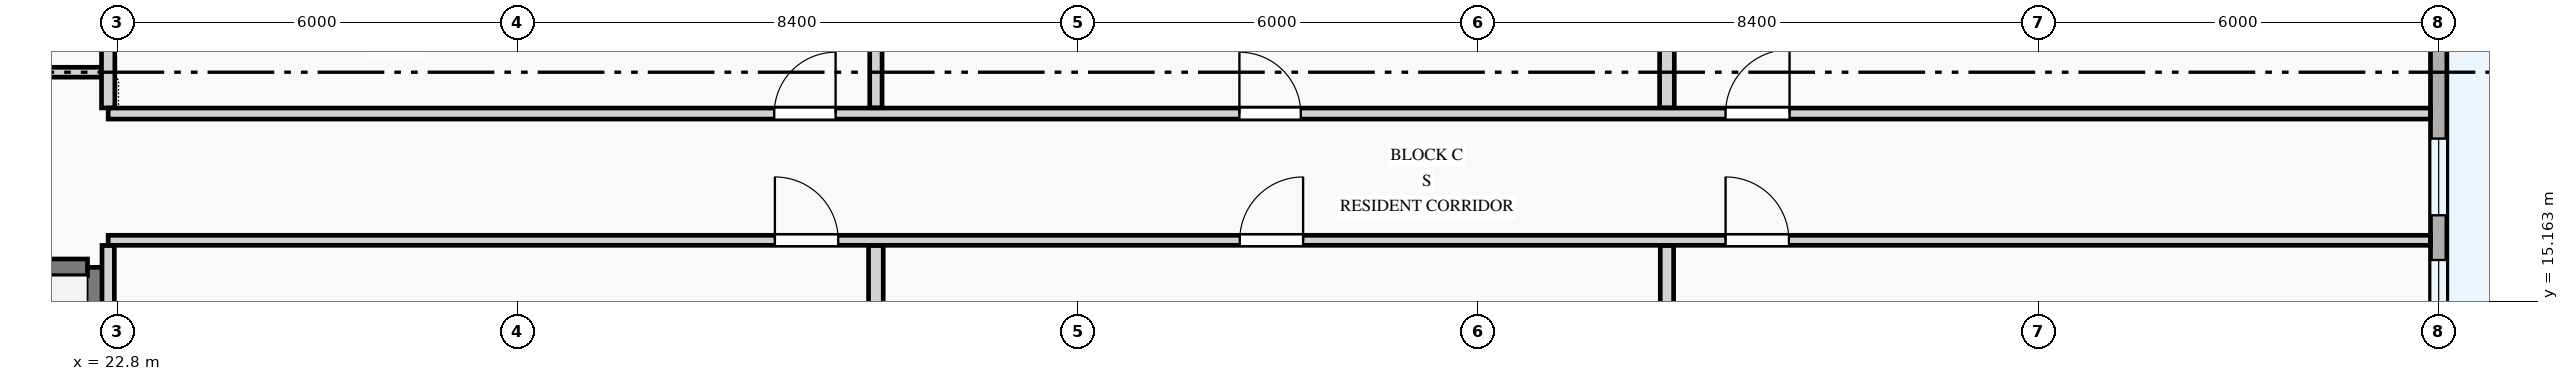
"""IFC4 building model, lengths in metres.
Left out: names, types, materials, properties, quantities, classifications, styles, units other than length and angle.
Written with IfcOpenShell. Run it as: python <this file> out.ifc"""

import sys

from ifc_helpers import new_model, si_unit, direction, frame, frame_2d, origin, place, context, subcontext, project, spatial, rectangle, extrude, element, fill, save


model = new_model("IFC4")
c1 = context("Model", 3, precision=1e-05, world=origin(), true_north=direction((0.0, 1.0)))
c2 = subcontext(c1, "Body", "Model", "MODEL_VIEW")
j1 = project(units=[si_unit("LENGTHUNIT", "METRE"), si_unit("PLANEANGLEUNIT", "RADIAN")], contexts=[c1])
p1 = place(None, origin())
s1 = spatial("IfcSite", under=j1, at=p1, CompositionType="ELEMENT")
p2 = place(p1, origin())
s2 = spatial("IfcBuilding", under=s1, at=p2, CompositionType="ELEMENT")
p3 = place(p2, origin())
s3 = spatial("IfcBuildingStorey", under=s2, at=p3, CompositionType="ELEMENT", Elevation=0.0)
p4 = place(p3, frame((57.6, 14.4, 0.0), z_axis=(0.0, 0.0, 1.0), x_axis=(0.0, 1.0, 0.0)))
e1 = element("IfcWall", 1, at=p4, inside=s3, PredefinedType="STANDARD", context=c2, shape_type="SweptSolid", body=[
    extrude(rectangle(XDim=8.4, YDim=0.245, at=frame_2d((4.2, 0.0))), origin(), (0.0, 0.0, 1.0), 3.485),
])
p5 = place(p4, frame((0.485, 0.0, 0.78)))
e2 = element("IfcOpeningElement", 2, at=p5, cuts=e1, PredefinedType="OPENING", context=c2, shape_type="SweptSolid", body=[
    extrude(rectangle(XDim=0.9, YDim=1.2, at=frame_2d((0.45, 0.6))), frame((0.0, 0.133, 0.0), z_axis=(0.0, -1.0, 0.0), x_axis=(1.0, 0.0, 0.0)), (0.0, 0.0, 1.0), 0.265),
])
p6 = place(p4, frame((2.055, 0.0, 0.78)))
e3 = element("IfcOpeningElement", 3, at=p6, cuts=e1, PredefinedType="OPENING", context=c2, shape_type="SweptSolid", body=[
    extrude(rectangle(XDim=1.15, YDim=1.25, at=frame_2d((0.575, 0.625))), frame((0.0, 0.133, 0.0), z_axis=(0.0, -1.0, 0.0), x_axis=(1.0, 0.0, 0.0)), (0.0, 0.0, 1.0), 0.265),
])
p7 = place(p4, frame((5.095, 0.0, 0.78)))
e4 = element("IfcOpeningElement", 4, at=p7, cuts=e1, PredefinedType="OPENING", context=c2, shape_type="SweptSolid", body=[
    extrude(rectangle(XDim=1.6, YDim=1.75, at=frame_2d((0.8, 0.875))), frame((0.0, 0.133, 0.0), z_axis=(0.0, -1.0, 0.0), x_axis=(1.0, 0.0, 0.0)), (0.0, 0.0, 1.0), 0.265),
])
p8 = place(p3, frame((22.475, 8.75, 0.0), z_axis=(0.0, 0.0, 1.0), x_axis=(0.0, 1.0, 0.0)))
e5 = element("IfcWall", 5, at=p8, inside=s3, PredefinedType="SHEAR", context=c2, shape_type="SweptSolid", body=[
    extrude(rectangle(XDim=6.925, YDim=0.3, at=frame_2d((3.462, 0.0))), origin(), (0.0, 0.0, 1.0), 4.2),
])
p9 = place(p3, frame((8.85, 15.675, 0.0), z_axis=(0.0, 0.0, 1.0), x_axis=(1.0, 0.0, 0.0)))
e6 = element("IfcWall", 6, at=p9, inside=s3, PredefinedType="SHEAR", context=c2, shape_type="SweptSolid", body=[
    extrude(rectangle(XDim=13.5, YDim=0.25, at=frame_2d((6.75, 0.0))), origin(), (0.0, 0.0, 1.0), 4.2),
])
p10 = place(p9, frame((6.2, 0.0, 0.0)))
e7 = element("IfcOpeningElement", 7, at=p10, cuts=e6, PredefinedType="OPENING", context=c2, shape_type="SweptSolid", body=[
    extrude(rectangle(XDim=1.1, YDim=2.15, at=frame_2d((0.55, 1.075))), frame((0.0, 0.135, 0.0), z_axis=(0.0, -1.0, 0.0), x_axis=(1.0, 0.0, 0.0)), (0.0, 0.0, 1.0), 0.27),
])
p11 = place(p3, frame((18.025, 18.6, 0.0), z_axis=(0.0, 0.0, 1.0), x_axis=(1.0, 0.0, 0.0)))
e8 = element("IfcWall", 8, at=p11, inside=s3, PredefinedType="PARTITIONING", context=c2, shape_type="SweptSolid", body=[
    extrude(rectangle(XDim=4.533, YDim=0.148, at=frame_2d((2.267, 0.0))), origin(), (0.0, 0.0, 1.0), 4.2),
])
p12 = place(p11, frame((1.65, 0.0, 0.0)))
e9 = element("IfcOpeningElement", 9, at=p12, cuts=e8, PredefinedType="OPENING", context=c2, shape_type="SweptSolid", body=[
    extrude(rectangle(XDim=1.0, YDim=2.15, at=frame_2d((0.5, 1.075))), frame((0.0, 0.084, 0.0), z_axis=(0.0, -1.0, 0.0), x_axis=(1.0, 0.0, 0.0)), (0.0, 0.0, 1.0), 0.168),
])
p13 = place(p3, frame((22.66, 8.524, 0.0), z_axis=(0.0, 0.0, 1.0), x_axis=(0.0, 1.0, 0.0)))
e10 = element("IfcWall", 10, at=p13, inside=s3, PredefinedType="PARTITIONING", context=c2, shape_type="SweptSolid", body=[
    extrude(rectangle(XDim=7.479, YDim=0.185, at=frame_2d((3.739, 0.0))), origin(), (0.0, 0.0, 1.0), 3.485),
])
p14 = place(p3, frame((22.66, 18.064, 0.0), z_axis=(0.0, 0.0, 1.0), x_axis=(0.0, 1.0, 0.0)))
e11 = element("IfcWall", 11, at=p14, inside=s3, PredefinedType="PARTITIONING", context=c2, shape_type="SweptSolid", body=[
    extrude(rectangle(XDim=4.676, YDim=0.2, at=frame_2d((2.338, 0.0))), origin(), (0.0, 0.0, 1.0), 3.485),
])
p15 = place(p3, frame((34.17, 8.524, 0.0), z_axis=(0.0, 0.0, 1.0), x_axis=(0.0, 1.0, 0.0)))
e12 = element("IfcWall", 12, at=p15, inside=s3, PredefinedType="PARTITIONING", context=c2, shape_type="SweptSolid", body=[
    extrude(rectangle(XDim=7.479, YDim=0.22, at=frame_2d((3.739, 0.0))), origin(), (0.0, 0.0, 1.0), 4.2),
])
p16 = place(p3, frame((34.17, 18.064, 0.0), z_axis=(0.0, 0.0, 1.0), x_axis=(0.0, 1.0, 0.0)))
e13 = element("IfcWall", 13, at=p16, inside=s3, PredefinedType="PARTITIONING", context=c2, shape_type="SweptSolid", body=[
    extrude(rectangle(XDim=4.611, YDim=0.185, at=frame_2d((2.306, 0.0))), origin(), (0.0, 0.0, 1.0), 4.2),
])
p17 = place(p3, frame((46.03, 8.524, 0.0), z_axis=(0.0, 0.0, 1.0), x_axis=(0.0, 1.0, 0.0)))
e14 = element("IfcWall", 14, at=p17, inside=s3, PredefinedType="PARTITIONING", context=c2, shape_type="SweptSolid", body=[
    extrude(rectangle(XDim=7.479, YDim=0.2, at=frame_2d((3.739, 0.0))), origin(), (0.0, 0.0, 1.0), 4.2),
])
p18 = place(p3, frame((46.03, 18.064, 0.0), z_axis=(0.0, 0.0, 1.0), x_axis=(0.0, 1.0, 0.0)))
e15 = element("IfcWall", 15, at=p18, inside=s3, PredefinedType="PARTITIONING", context=c2, shape_type="SweptSolid", body=[
    extrude(rectangle(XDim=4.611, YDim=0.22, at=frame_2d((2.306, 0.0))), origin(), (0.0, 0.0, 1.0), 4.2),
])
p19 = place(p3, frame((22.66, 16.08, 0.0), z_axis=(0.0, 0.0, 1.0), x_axis=(1.0, 0.0, 0.0)))
e16 = element("IfcWall", 16, at=p19, inside=s3, PredefinedType="PARTITIONING", context=c2, shape_type="SweptSolid", body=[
    extrude(rectangle(XDim=34.816, YDim=0.15, at=frame_2d((17.408, 0.0))), origin(), (0.0, 0.0, 1.0), 4.2),
])
p20 = place(p19, frame((9.996, 0.0, 0.0)))
e17 = element("IfcOpeningElement", 17, at=p20, cuts=e16, PredefinedType="OPENING", context=c2, shape_type="SweptSolid", body=[
    extrude(rectangle(XDim=0.95, YDim=2.1, at=frame_2d((0.475, 1.05))), frame((0.0, 0.085, 0.0), z_axis=(0.0, -1.0, 0.0), x_axis=(1.0, 0.0, 0.0)), (0.0, 0.0, 1.0), 0.17),
])
p21 = place(p19, frame((16.965, 0.0, 0.0)))
e18 = element("IfcOpeningElement", 18, at=p21, cuts=e16, PredefinedType="OPENING", context=c2, shape_type="SweptSolid", body=[
    extrude(rectangle(XDim=0.95, YDim=2.1, at=frame_2d((0.475, 1.05))), frame((0.0, 0.085, 0.0), z_axis=(0.0, -1.0, 0.0), x_axis=(1.0, 0.0, 0.0)), (0.0, 0.0, 1.0), 0.17),
])
p22 = place(p19, frame((24.249, 0.0, 0.0)))
e19 = element("IfcOpeningElement", 19, at=p22, cuts=e16, PredefinedType="OPENING", context=c2, shape_type="SweptSolid", body=[
    extrude(rectangle(XDim=0.95, YDim=2.1, at=frame_2d((0.475, 1.05))), frame((0.0, 0.085, 0.0), z_axis=(0.0, -1.0, 0.0), x_axis=(1.0, 0.0, 0.0)), (0.0, 0.0, 1.0), 0.17),
])
p23 = place(p3, frame((22.66, 17.98, 0.0), z_axis=(0.0, 0.0, 1.0), x_axis=(1.0, 0.0, 0.0)))
e20 = element("IfcWall", 20, at=p23, inside=s3, PredefinedType="PARTITIONING", context=c2, shape_type="SweptSolid", body=[
    extrude(rectangle(XDim=34.816, YDim=0.165, at=frame_2d((17.408, 0.0))), origin(), (0.0, 0.0, 1.0), 4.2),
])
p24 = place(p23, frame((9.986, 0.0, 0.0)))
e21 = element("IfcOpeningElement", 21, at=p24, cuts=e20, PredefinedType="OPENING", context=c2, shape_type="SweptSolid", body=[
    extrude(rectangle(XDim=0.92, YDim=2.1, at=frame_2d((0.46, 1.05))), frame((0.0, 0.093, 0.0), z_axis=(0.0, -1.0, 0.0), x_axis=(1.0, 0.0, 0.0)), (0.0, 0.0, 1.0), 0.185),
])
p25 = place(p23, frame((16.96, 0.0, 0.0)))
e22 = element("IfcOpeningElement", 22, at=p25, cuts=e20, PredefinedType="OPENING", context=c2, shape_type="SweptSolid", body=[
    extrude(rectangle(XDim=0.92, YDim=2.1, at=frame_2d((0.46, 1.05))), frame((0.0, 0.093, 0.0), z_axis=(0.0, -1.0, 0.0), x_axis=(1.0, 0.0, 0.0)), (0.0, 0.0, 1.0), 0.185),
])
p26 = place(p23, frame((24.248, 0.0, 0.0)))
e23 = element("IfcOpeningElement", 23, at=p26, cuts=e20, PredefinedType="OPENING", context=c2, shape_type="SweptSolid", body=[
    extrude(rectangle(XDim=0.96, YDim=2.12, at=frame_2d((0.48, 1.06))), frame((0.0, 0.093, 0.0), z_axis=(0.0, -1.0, 0.0), x_axis=(1.0, 0.0, 0.0)), (0.0, 0.0, 1.0), 0.185),
])
p27 = place(p5, origin())
e24 = element("IfcWindow", 24, at=p27, inside=s3, PartitioningType="SINGLE_PANEL", PredefinedType="WINDOW", context=c2, shape_type="SweptSolid", body=[
    extrude(rectangle(XDim=0.9, YDim=1.2, at=frame_2d((0.45, 0.6))), frame((0.0, 0.03, 0.0), z_axis=(0.0, -1.0, 0.0), x_axis=(1.0, 0.0, 0.0)), (0.0, 0.0, 1.0), 0.06),
])
fill(e2, e24)
p28 = place(p6, origin())
e25 = element("IfcWindow", 25, at=p28, inside=s3, PartitioningType="SINGLE_PANEL", PredefinedType="WINDOW", context=c2, shape_type="SweptSolid", body=[
    extrude(rectangle(XDim=1.15, YDim=1.25, at=frame_2d((0.575, 0.625))), frame((0.0, 0.03, 0.0), z_axis=(0.0, -1.0, 0.0), x_axis=(1.0, 0.0, 0.0)), (0.0, 0.0, 1.0), 0.06),
])
fill(e3, e25)
p29 = place(p20, origin())
e26 = element("IfcDoor", 26, at=p29, inside=s3, OperationType="SINGLE_SWING_LEFT", PredefinedType="DOOR", context=c2, shape_type="SweptSolid", body=[
    extrude(rectangle(XDim=0.95, YDim=2.1, at=frame_2d((0.475, 1.05))), frame((0.0, 0.025, 0.0), z_axis=(0.0, -1.0, 0.0), x_axis=(1.0, 0.0, 0.0)), (0.0, 0.0, 1.0), 0.05),
])
fill(e17, e26)
p30 = place(p21, origin())
e27 = element("IfcDoor", 27, at=p30, inside=s3, OperationType="SINGLE_SWING_RIGHT", PredefinedType="DOOR", context=c2, shape_type="SweptSolid", body=[
    extrude(rectangle(XDim=0.95, YDim=2.1, at=frame_2d((0.475, 1.05))), frame((0.0, 0.025, 0.0), z_axis=(0.0, -1.0, 0.0), x_axis=(1.0, 0.0, 0.0)), (0.0, 0.0, 1.0), 0.05),
])
fill(e18, e27)
p31 = place(p22, origin())
e28 = element("IfcDoor", 28, at=p31, inside=s3, OperationType="SINGLE_SWING_LEFT", PredefinedType="DOOR", context=c2, shape_type="SweptSolid", body=[
    extrude(rectangle(XDim=0.95, YDim=2.1, at=frame_2d((0.475, 1.05))), frame((0.0, 0.025, 0.0), z_axis=(0.0, -1.0, 0.0), x_axis=(1.0, 0.0, 0.0)), (0.0, 0.0, 1.0), 0.05),
])
fill(e19, e28)
p32 = place(p24, origin())
e29 = element("IfcDoor", 29, at=p32, inside=s3, OperationType="SINGLE_SWING_RIGHT", PredefinedType="DOOR", context=c2, shape_type="SweptSolid", body=[
    extrude(rectangle(XDim=0.92, YDim=2.1, at=frame_2d((0.46, 1.05))), frame((0.0, 0.025, 0.0), z_axis=(0.0, -1.0, 0.0), x_axis=(1.0, 0.0, 0.0)), (0.0, 0.0, 1.0), 0.05),
])
fill(e21, e29)
p33 = place(p25, origin())
e30 = element("IfcDoor", 30, at=p33, inside=s3, OperationType="SINGLE_SWING_LEFT", PredefinedType="DOOR", context=c2, shape_type="SweptSolid", body=[
    extrude(rectangle(XDim=0.92, YDim=2.1, at=frame_2d((0.46, 1.05))), frame((0.0, 0.025, 0.0), z_axis=(0.0, -1.0, 0.0), x_axis=(1.0, 0.0, 0.0)), (0.0, 0.0, 1.0), 0.05),
])
fill(e22, e30)
p34 = place(p26, origin())
e31 = element("IfcDoor", 31, at=p34, inside=s3, OperationType="SINGLE_SWING_RIGHT", PredefinedType="DOOR", context=c2, shape_type="SweptSolid", body=[
    extrude(rectangle(XDim=0.96, YDim=2.12, at=frame_2d((0.48, 1.06))), frame((0.0, 0.025, 0.0), z_axis=(0.0, -1.0, 0.0), x_axis=(1.0, 0.0, 0.0)), (0.0, 0.0, 1.0), 0.05),
])
fill(e23, e31)
save(model, sys.argv[1])
